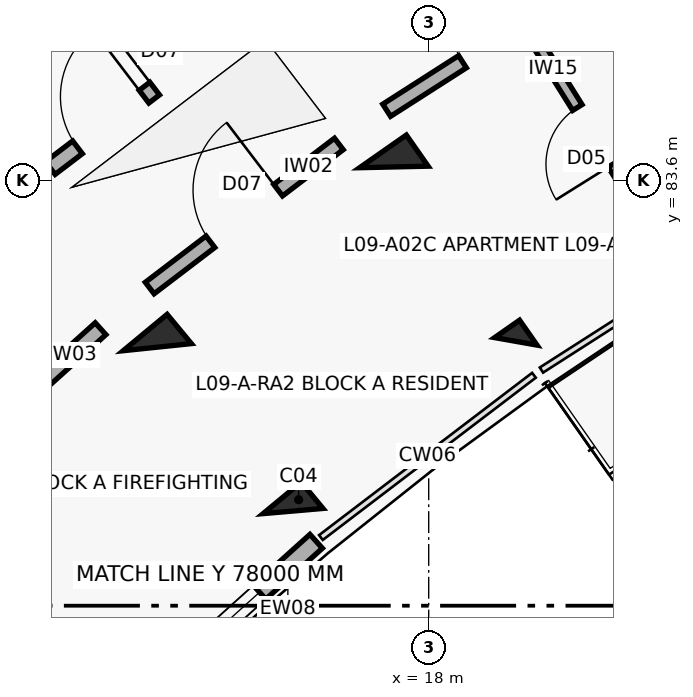
"""IFC4 building model, lengths in metres.
Left out: names, types, materials, properties, quantities, classifications, styles, units other than length and angle.
Written with IfcOpenShell. Run it as: python <this file> out.ifc"""

import sys

from ifc_helpers import new_model, si_unit, direction, frame, frame_2d, origin, origin_2d, place, context, subcontext, project, spatial, rectangle, extrude, element, fill, save


model = new_model("IFC4")
c1 = context("Model", 3, precision=1e-05, world=origin(), true_north=direction((0.0, 1.0)))
c2 = subcontext(c1, "Body", "Model", "MODEL_VIEW")
j1 = project(units=[si_unit("LENGTHUNIT", "METRE"), si_unit("PLANEANGLEUNIT", "RADIAN")], contexts=[c1])
p1 = place(None, origin())
s1 = spatial("IfcSite", under=j1, at=p1, CompositionType="ELEMENT")
p2 = place(p1, origin())
s2 = spatial("IfcBuilding", under=s1, at=p2, CompositionType="ELEMENT")
p3 = place(p2, frame((0.0, 0.0, 29.8)))
s3 = spatial("IfcBuildingStorey", under=s2, at=p3, CompositionType="ELEMENT", Elevation=29.8)
p4 = place(p3, frame((16.215, 79.245, 0.0), z_axis=(0.0, 0.0, 1.0), x_axis=(-0.637961754089, 0.770068049148, 0.0)))
e1 = element("IfcColumn", 1, at=p4, inside=s3, PredefinedType="COLUMN", context=c2, shape_type="SweptSolid", body=[
    extrude(rectangle(XDim=0.45, YDim=0.65, at=origin_2d()), origin(), (0.0, 0.0, 1.0), 3.1),
])
p5 = place(p3, frame((14.429, 81.402, 0.0), z_axis=(0.0, 0.0, 1.0), x_axis=(-0.637961754089, 0.770068049148, 0.0)))
e2 = element("IfcColumn", 2, at=p5, inside=s3, PredefinedType="COLUMN", context=c2, shape_type="SweptSolid", body=[
    extrude(rectangle(XDim=0.5, YDim=0.75, at=origin_2d()), origin(), (0.0, 0.0, 1.0), 3.1),
])
p6 = place(p3, frame((19.146, 81.478, 0.0), z_axis=(0.0, 0.0, 1.0), x_axis=(-0.573004420611, 0.819552276527, 0.0)))
e3 = element("IfcColumn", 3, at=p6, inside=s3, PredefinedType="COLUMN", context=c2, shape_type="SweptSolid", body=[
    extrude(rectangle(XDim=0.4, YDim=0.4, at=origin_2d()), origin(), (0.0, 0.0, 1.0), 3.1),
])
p7 = place(p3, frame((17.542, 83.773, 0.0), z_axis=(0.0, 0.0, 1.0), x_axis=(-0.573004420611, 0.819552276527, 0.0)))
e4 = element("IfcColumn", 4, at=p7, inside=s3, PredefinedType="COLUMN", context=c2, shape_type="SweptSolid", body=[
    extrude(rectangle(XDim=0.5, YDim=0.75, at=origin_2d()), origin(), (0.0, 0.0, 1.0), 3.1),
])
p8 = place(p3, frame((13.84, 76.437, 0.0), z_axis=(0.0, 0.0, 1.0), x_axis=(0.743385092197, 0.668863666751, 0.0)))
e5 = element("IfcWall", 5, at=p8, inside=s3, PredefinedType="SOLIDWALL", context=c2, shape_type="SweptSolid", body=[
    extrude(rectangle(XDim=3.604, YDim=0.245, at=frame_2d((1.802, 0.0))), origin(), (0.0, 0.0, 1.0), 2.25),
])
p9 = place(p8, frame((1.002, 0.0, 0.32)))
e6 = element("IfcOpeningElement", 6, at=p9, cuts=e5, PredefinedType="OPENING", context=c2, shape_type="SweptSolid", body=[
    extrude(rectangle(XDim=1.6, YDim=1.5, at=frame_2d((0.8, 0.75))), frame((0.0, 0.133, 0.0), z_axis=(0.0, -1.0, 0.0), x_axis=(1.0, 0.0, 0.0)), (0.0, 0.0, 1.0), 0.265),
])
p10 = place(p3, frame((11.357, 79.552, 0.0), z_axis=(0.0, 0.0, 1.0), x_axis=(0.743387266925, 0.668861249718, 0.0)))
e7 = element("IfcWall", 7, at=p10, inside=s3, PredefinedType="SOLIDWALL", context=c2, shape_type="SweptSolid", body=[
    extrude(rectangle(XDim=3.128, YDim=0.21, at=frame_2d((1.564, 0.0))), origin(), (0.0, 0.0, 1.0), 2.08),
])
p11 = place(p10, frame((1.014, 0.0, 0.0)))
e8 = element("IfcOpeningElement", 8, at=p11, cuts=e7, PredefinedType="OPENING", context=c2, shape_type="SweptSolid", body=[
    extrude(rectangle(XDim=1.1, YDim=2.15, at=frame_2d((0.55, 1.075))), frame((0.0, 0.115, 0.0), z_axis=(0.0, -1.0, 0.0), x_axis=(1.0, 0.0, 0.0)), (0.0, 0.0, 1.0), 0.23),
])
p12 = place(p3, frame((13.021, 83.759, 0.0), z_axis=(0.0, 0.0, 1.0), x_axis=(0.795498026433, 0.605956178235, 0.0)))
e9 = element("IfcWall", 9, at=p12, inside=s3, PredefinedType="SOLIDWALL", context=c2, shape_type="SweptSolid", body=[
    extrude(rectangle(XDim=3.296, YDim=0.21, at=frame_2d((1.648, 0.0))), origin(), (0.0, 0.0, 1.0), 2.08),
])
p13 = place(p12, frame((0.45, 0.0, 0.0)))
e10 = element("IfcOpeningElement", 10, at=p13, cuts=e9, PredefinedType="OPENING", context=c2, shape_type="SweptSolid", body=[
    extrude(rectangle(XDim=1.1, YDim=2.15, at=frame_2d((0.55, 1.075))), frame((0.0, 0.115, 0.0), z_axis=(0.0, -1.0, 0.0), x_axis=(1.0, 0.0, 0.0)), (0.0, 0.0, 1.0), 0.23),
])
p14 = place(p12, frame((1.726, 0.0, 0.0)))
e11 = element("IfcOpeningElement", 11, at=p14, cuts=e9, PredefinedType="OPENING", context=c2, shape_type="SweptSolid", body=[
    extrude(rectangle(XDim=1.12, YDim=2.15, at=frame_2d((0.56, 1.075))), frame((0.0, 0.115, 0.0), z_axis=(0.0, -1.0, 0.0), x_axis=(1.0, 0.0, 0.0)), (0.0, 0.0, 1.0), 0.23),
])
p15 = place(p3, frame((14.329, 82.18, 0.0), z_axis=(0.0, 0.0, 1.0), x_axis=(0.795501577908, 0.605951515838, 0.0)))
e12 = element("IfcWall", 12, at=p15, inside=s3, PredefinedType="SOLIDWALL", context=c2, shape_type="SweptSolid", body=[
    extrude(rectangle(XDim=3.129, YDim=0.19, at=frame_2d((1.564, 0.0))), origin(), (0.0, 0.0, 1.0), 2.08),
])
p16 = place(p15, frame((1.004, 0.0, 0.0)))
e13 = element("IfcOpeningElement", 13, at=p16, cuts=e12, PredefinedType="OPENING", context=c2, shape_type="SweptSolid", body=[
    extrude(rectangle(XDim=1.12, YDim=2.15, at=frame_2d((0.56, 1.075))), frame((0.0, 0.105, 0.0), z_axis=(0.0, -1.0, 0.0), x_axis=(1.0, 0.0, 0.0)), (0.0, 0.0, 1.0), 0.21),
])
p17 = place(p3, frame((17.447, 84.519, 0.0), z_axis=(0.0, 0.0, 1.0), x_axis=(0.842225276846, 0.539125758095, 0.0)))
e14 = element("IfcWall", 14, at=p17, inside=s3, PredefinedType="SOLIDWALL", context=c2, shape_type="SweptSolid", body=[
    extrude(rectangle(XDim=3.269, YDim=0.19, at=frame_2d((1.634, 0.0))), origin(), (0.0, 0.0, 1.0), 2.08),
])
p18 = place(p17, frame((1.184, 0.0, 0.0)))
e15 = element("IfcOpeningElement", 15, at=p18, cuts=e14, PredefinedType="OPENING", context=c2, shape_type="SweptSolid", body=[
    extrude(rectangle(XDim=0.9, YDim=2.1, at=frame_2d((0.45, 1.05))), frame((0.0, 0.105, 0.0), z_axis=(0.0, -1.0, 0.0), x_axis=(1.0, 0.0, 0.0)), (0.0, 0.0, 1.0), 0.21),
])
p19 = place(p3, frame((21.064, 82.783, 0.0), z_axis=(0.0, 0.0, 1.0), x_axis=(-0.53015188203, 0.847902696057, 0.0)))
e16 = element("IfcWall", 16, at=p19, inside=s3, PredefinedType="PARTITIONING", context=c2, shape_type="SweptSolid", body=[
    extrude(rectangle(XDim=3.3, YDim=0.145, at=frame_2d((1.65, 0.0))), origin(), (0.0, 0.0, 1.0), 2.08),
])
p20 = place(p19, frame((1.21, 0.0, 0.0)))
e17 = element("IfcOpeningElement", 17, at=p20, cuts=e16, PredefinedType="OPENING", context=c2, shape_type="SweptSolid", body=[
    extrude(rectangle(XDim=0.88, YDim=2.1, at=frame_2d((0.44, 1.05))), frame((0.0, 0.083, 0.0), z_axis=(0.0, -1.0, 0.0), x_axis=(1.0, 0.0, 0.0)), (0.0, 0.0, 1.0), 0.165),
])
p21 = place(p9, origin())
e18 = element("IfcWindow", 18, at=p21, inside=s3, PartitioningType="DOUBLE_PANEL_VERTICAL", PredefinedType="WINDOW", context=c2, shape_type="SweptSolid", body=[
    extrude(rectangle(XDim=1.6, YDim=1.5, at=frame_2d((0.8, 0.75))), frame((0.0, 0.03, 0.0), z_axis=(0.0, -1.0, 0.0), x_axis=(1.0, 0.0, 0.0)), (0.0, 0.0, 1.0), 0.06),
])
fill(e6, e18)
p22 = place(p13, origin())
e19 = element("IfcDoor", 19, at=p22, inside=s3, OperationType="SINGLE_SWING_RIGHT", PredefinedType="DOOR", context=c2, shape_type="SweptSolid", body=[
    extrude(rectangle(XDim=1.1, YDim=2.15, at=frame_2d((0.55, 1.075))), frame((0.0, 0.025, 0.0), z_axis=(0.0, -1.0, 0.0), x_axis=(1.0, 0.0, 0.0)), (0.0, 0.0, 1.0), 0.05),
])
fill(e10, e19)
p23 = place(p14, origin())
e20 = element("IfcDoor", 20, at=p23, inside=s3, OperationType="SINGLE_SWING_LEFT", PredefinedType="DOOR", context=c2, shape_type="SweptSolid", body=[
    extrude(rectangle(XDim=1.12, YDim=2.15, at=frame_2d((0.56, 1.075))), frame((0.0, 0.025, 0.0), z_axis=(0.0, -1.0, 0.0), x_axis=(1.0, 0.0, 0.0)), (0.0, 0.0, 1.0), 0.05),
])
fill(e11, e20)
p24 = place(p16, origin())
e21 = element("IfcDoor", 21, at=p24, inside=s3, OperationType="SINGLE_SWING_RIGHT", PredefinedType="DOOR", context=c2, shape_type="SweptSolid", body=[
    extrude(rectangle(XDim=1.12, YDim=2.15, at=frame_2d((0.56, 1.075))), frame((0.0, 0.025, 0.0), z_axis=(0.0, -1.0, 0.0), x_axis=(1.0, 0.0, 0.0)), (0.0, 0.0, 1.0), 0.05),
])
fill(e13, e21)
p25 = place(p18, origin())
e22 = element("IfcDoor", 22, at=p25, inside=s3, OperationType="SINGLE_SWING_RIGHT", PredefinedType="DOOR", context=c2, shape_type="SweptSolid", body=[
    extrude(rectangle(XDim=0.9, YDim=2.1, at=frame_2d((0.45, 1.05))), frame((0.0, 0.025, 0.0), z_axis=(0.0, -1.0, 0.0), x_axis=(1.0, 0.0, 0.0)), (0.0, 0.0, 1.0), 0.05),
])
fill(e15, e22)
p26 = place(p20, origin())
e23 = element("IfcDoor", 23, at=p26, inside=s3, OperationType="SINGLE_SWING_LEFT", PredefinedType="DOOR", context=c2, shape_type="SweptSolid", body=[
    extrude(rectangle(XDim=0.88, YDim=2.1, at=frame_2d((0.44, 1.05))), frame((0.0, 0.025, 0.0), z_axis=(0.0, -1.0, 0.0), x_axis=(1.0, 0.0, 0.0)), (0.0, 0.0, 1.0), 0.05),
])
fill(e17, e23)
save(model, sys.argv[1])
